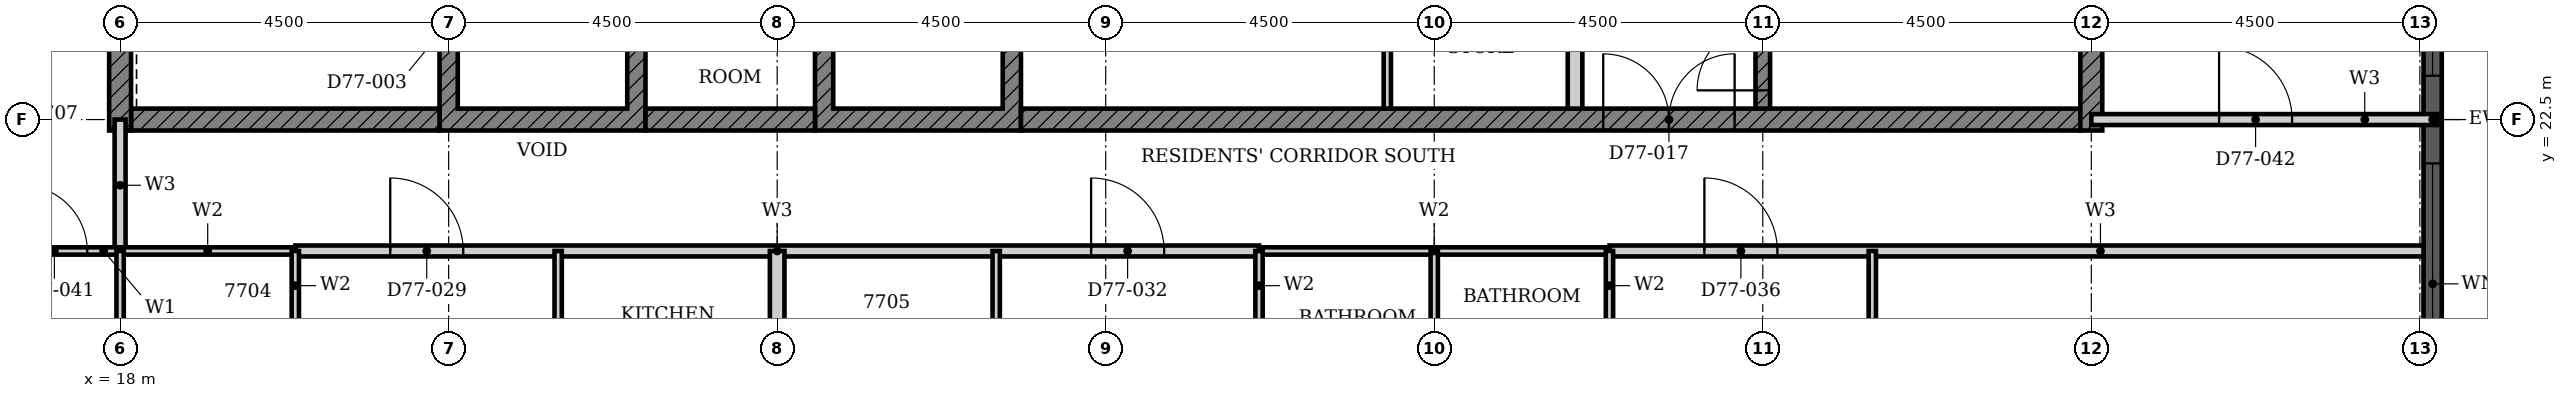
"""IFC4 building model, lengths in metres.
Left out: names, types, materials, properties, quantities, classifications, styles, units other than length and angle.
Written with IfcOpenShell. Run it as: python <this file> out.ifc"""

import sys

from ifc_helpers import new_model, si_unit, direction, frame, frame_2d, origin, place, context, subcontext, project, spatial, polyline, rectangle, outline, extrude, element, fill, save


model = new_model("IFC4")
c1 = context("Model", 3, precision=1e-05, world=origin(), true_north=direction((0.0, 1.0)))
c2 = subcontext(c1, "Body", "Model", "MODEL_VIEW")
j1 = project(units=[si_unit("LENGTHUNIT", "METRE"), si_unit("PLANEANGLEUNIT", "RADIAN")], contexts=[c1])
p1 = place(None, origin())
s1 = spatial("IfcSite", under=j1, at=p1, CompositionType="ELEMENT")
p2 = place(p1, origin())
s2 = spatial("IfcBuilding", under=s1, at=p2, CompositionType="ELEMENT")
p3 = place(p2, frame((0.0, 0.0, 301.9)))
s3 = spatial("IfcBuildingStorey", under=s2, at=p3, CompositionType="ELEMENT", Elevation=301.9)
p4 = place(p3, frame((49.675, 18.3, 0.0), z_axis=(0.0, 0.0, 1.0), x_axis=(0.0, 1.0, 0.0)))
e1 = element("IfcWall", 1, at=p4, inside=s3, PredefinedType="SOLIDWALL", context=c2, shape_type="SweptSolid", body=[
    extrude(rectangle(XDim=8.4, YDim=0.25, at=frame_2d((4.2, 0.0))), origin(), (0.0, 0.0, 1.0), 3.7),
])
p5 = place(p4, frame((0.3, 0.0, 0.45)))
e2 = element("IfcOpeningElement", 2, at=p5, cuts=e1, PredefinedType="OPENING", context=c2, shape_type="SweptSolid", body=[
    extrude(rectangle(XDim=3.3, YDim=1.8, at=frame_2d((1.65, 0.9))), frame((0.0, 0.135, 0.0), z_axis=(0.0, -1.0, 0.0), x_axis=(1.0, 0.0, 0.0)), (0.0, 0.0, 1.0), 0.27),
])
p6 = place(p4, frame((4.8, 0.0, 0.45)))
e3 = element("IfcOpeningElement", 3, at=p6, cuts=e1, PredefinedType="OPENING", context=c2, shape_type="SweptSolid", body=[
    extrude(rectangle(XDim=3.3, YDim=1.8, at=frame_2d((1.65, 0.9))), frame((0.0, 0.135, 0.0), z_axis=(0.0, -1.0, 0.0), x_axis=(1.0, 0.0, 0.0)), (0.0, 0.0, 1.0), 0.27),
])
p7 = place(p3, origin())
e4 = element("IfcWall", 4, at=p7, inside=s3, PredefinedType="SHEAR", context=c2, shape_type="SweptSolid", body=[
    extrude(outline(polyline([(22.375, 22.35), (25.197, 22.35), (25.197, 25.275), (24.947, 25.275), (24.947, 22.65), (22.625, 22.65), (22.625, 25.275), (22.375, 25.275), (22.375, 22.35)])), origin(), (0.0, 0.0, 1.0), 3.2),
])
p8 = place(p3, origin())
e5 = element("IfcWall", 5, at=p8, inside=s3, PredefinedType="SHEAR", context=c2, shape_type="SweptSolid", body=[
    extrude(outline(polyline([(27.518, 22.35), (30.339, 22.35), (30.339, 25.275), (30.089, 25.275), (30.089, 22.65), (27.768, 22.65), (27.768, 25.275), (27.518, 25.275), (27.518, 22.35)])), origin(), (0.0, 0.0, 1.0), 3.2),
])
p9 = place(p3, frame((18.15, 22.5, 0.0), z_axis=(0.0, 0.0, 1.0), x_axis=(1.0, 0.0, 0.0)))
e6 = element("IfcWall", 6, at=p9, inside=s3, PredefinedType="SHEAR", context=c2, shape_type="SweptSolid", body=[
    extrude(rectangle(XDim=4.225, YDim=0.3, at=frame_2d((2.113, 0.0))), origin(), (0.0, 0.0, 1.0), 3.2),
])
p10 = place(p3, frame((25.197, 22.5, 0.0), z_axis=(0.0, 0.0, 1.0), x_axis=(1.0, 0.0, 0.0)))
e7 = element("IfcWall", 7, at=p10, inside=s3, PredefinedType="SHEAR", context=c2, shape_type="SweptSolid", body=[
    extrude(rectangle(XDim=2.321, YDim=0.3, at=frame_2d((1.161, 0.0))), origin(), (0.0, 0.0, 1.0), 3.2),
])
p11 = place(p3, frame((30.339, 22.5, 0.0), z_axis=(0.0, 0.0, 1.0), x_axis=(1.0, 0.0, 0.0)))
e8 = element("IfcWall", 8, at=p11, inside=s3, PredefinedType="SHEAR", context=c2, shape_type="SweptSolid", body=[
    extrude(rectangle(XDim=14.511, YDim=0.3, at=frame_2d((7.255, 0.0))), origin(), (0.0, 0.0, 1.0), 3.2),
])
p12 = place(p11, frame((7.975, 0.0, 0.0)))
e9 = element("IfcOpeningElement", 9, at=p12, cuts=e8, PredefinedType="OPENING", context=c2, shape_type="SweptSolid", body=[
    extrude(rectangle(XDim=1.8, YDim=2.1, at=frame_2d((0.9, 1.05))), frame((0.0, 0.16, 0.0), z_axis=(0.0, -1.0, 0.0), x_axis=(1.0, 0.0, 0.0)), (0.0, 0.0, 1.0), 0.32),
])
for number, where, z_axis, x_axis in (
    (10, (18.0, 22.35, 0.0), (0.0, 0.0, 1.0), (0.0, 1.0, 0.0)),
    (11, (45.0, 22.35, 0.0), (0.0, 0.0, 1.0), (0.0, 1.0, 0.0)),
):
    element("IfcWall", number, at=place(p3, frame(where, z_axis=z_axis, x_axis=x_axis)), inside=s3, PredefinedType="SHEAR", context=c2, shape_type="SweptSolid", body=[
        extrude(rectangle(XDim=9.3, YDim=0.3, at=frame_2d((4.65, 0.0))), origin(), (0.0, 0.0, 1.0), 3.2),
    ])
p13 = place(p3, frame((37.928, 22.65, 0.0), z_axis=(0.0, 0.0, 1.0), x_axis=(0.0, 1.0, 0.0)))
e12 = element("IfcWall", 12, at=p13, inside=s3, PredefinedType="PARTITIONING", context=c2, shape_type="SweptSolid", body=[
    extrude(rectangle(XDim=2.625, YDim=0.2, at=frame_2d((1.312, 0.0))), origin(), (0.0, 0.0, 1.0), 3.2),
])
p14 = place(p3, frame((35.357, 22.65, 0.0), z_axis=(0.0, 0.0, 1.0), x_axis=(0.0, 1.0, 0.0)))
e13 = element("IfcWall", 13, at=p14, inside=s3, PredefinedType="PARTITIONING", context=c2, shape_type="SweptSolid", body=[
    extrude(rectangle(XDim=2.625, YDim=0.1, at=frame_2d((1.312, 0.0))), origin(), (0.0, 0.0, 1.0), 3.2),
])
p15 = place(p3, frame((40.5, 22.65, 0.0), z_axis=(0.0, 0.0, 1.0), x_axis=(0.0, 1.0, 0.0)))
e14 = element("IfcWall", 14, at=p15, inside=s3, PredefinedType="SHEAR", context=c2, shape_type="SweptSolid", body=[
    extrude(rectangle(XDim=5.825, YDim=0.2, at=frame_2d((2.913, 0.0))), origin(), (0.0, 0.0, 1.0), 3.2),
])
p16 = place(p15, frame((0.25, 0.0, 0.0)))
e15 = element("IfcOpeningElement", 15, at=p16, cuts=e14, PredefinedType="OPENING", context=c2, shape_type="SweptSolid", body=[
    extrude(rectangle(XDim=1.8, YDim=2.1, at=frame_2d((0.9, 1.05))), frame((0.0, 0.11, 0.0), z_axis=(0.0, -1.0, 0.0), x_axis=(1.0, 0.0, 0.0)), (0.0, 0.0, 1.0), 0.22),
])
p17 = place(p3, frame((20.4, 20.7, 0.0), z_axis=(0.0, 0.0, 1.0), x_axis=(1.0, 0.0, 0.0)))
e16 = element("IfcWall", 16, at=p17, inside=s3, PredefinedType="PARTITIONING", context=c2, shape_type="SweptSolid", body=[
    extrude(rectangle(XDim=13.2, YDim=0.15, at=frame_2d((6.6, 0.0))), origin(), (0.0, 0.0, 1.0), 3.2),
])
p18 = place(p17, frame((1.3, 0.0, 0.0)))
e17 = element("IfcOpeningElement", 17, at=p18, cuts=e16, PredefinedType="OPENING", context=c2, shape_type="SweptSolid", body=[
    extrude(rectangle(XDim=1.0, YDim=2.2, at=frame_2d((0.5, 1.1))), frame((0.0, 0.085, 0.0), z_axis=(0.0, -1.0, 0.0), x_axis=(1.0, 0.0, 0.0)), (0.0, 0.0, 1.0), 0.17),
])
p19 = place(p17, frame((10.9, 0.0, 0.0)))
e18 = element("IfcOpeningElement", 18, at=p19, cuts=e16, PredefinedType="OPENING", context=c2, shape_type="SweptSolid", body=[
    extrude(rectangle(XDim=1.0, YDim=2.2, at=frame_2d((0.5, 1.1))), frame((0.0, 0.085, 0.0), z_axis=(0.0, -1.0, 0.0), x_axis=(1.0, 0.0, 0.0)), (0.0, 0.0, 1.0), 0.17),
])
p20 = place(p3, frame((38.4, 20.7, 0.0), z_axis=(0.0, 0.0, 1.0), x_axis=(1.0, 0.0, 0.0)))
e19 = element("IfcWall", 19, at=p20, inside=s3, PredefinedType="PARTITIONING", context=c2, shape_type="SweptSolid", body=[
    extrude(rectangle(XDim=11.15, YDim=0.15, at=frame_2d((5.575, 0.0))), origin(), (0.0, 0.0, 1.0), 3.2),
])
p21 = place(p20, frame((1.3, 0.0, 0.0)))
e20 = element("IfcOpeningElement", 20, at=p21, cuts=e19, PredefinedType="OPENING", context=c2, shape_type="SweptSolid", body=[
    extrude(rectangle(XDim=1.0, YDim=2.2, at=frame_2d((0.5, 1.1))), frame((0.0, 0.085, 0.0), z_axis=(0.0, -1.0, 0.0), x_axis=(1.0, 0.0, 0.0)), (0.0, 0.0, 1.0), 0.17),
])
p22 = place(p3, frame((45.0, 22.5, 0.0), z_axis=(0.0, 0.0, 1.0), x_axis=(1.0, 0.0, 0.0)))
e21 = element("IfcWall", 21, at=p22, inside=s3, PredefinedType="PARTITIONING", context=c2, shape_type="SweptSolid", body=[
    extrude(rectangle(XDim=4.74, YDim=0.15, at=frame_2d((2.37, 0.0))), origin(), (0.0, 0.0, 1.0), 3.2),
])
p23 = place(p22, frame((1.75, 0.0, 0.0)))
e22 = element("IfcOpeningElement", 22, at=p23, cuts=e21, PredefinedType="OPENING", context=c2, shape_type="SweptSolid", body=[
    extrude(rectangle(XDim=1.0, YDim=2.2, at=frame_2d((0.5, 1.1))), frame((0.0, 0.085, 0.0), z_axis=(0.0, -1.0, 0.0), x_axis=(1.0, 0.0, 0.0)), (0.0, 0.0, 1.0), 0.17),
])
p24 = place(p3, frame((18.0, 20.7, 0.0), z_axis=(0.0, 0.0, 1.0), x_axis=(0.0, 1.0, 0.0)))
e23 = element("IfcWall", 23, at=p24, inside=s3, PredefinedType="PARTITIONING", context=c2, shape_type="SweptSolid", body=[
    extrude(rectangle(XDim=1.8, YDim=0.15, at=frame_2d((0.9, 0.0))), origin(), (0.0, 0.0, 1.0), 3.2),
])
p25 = place(p3, frame((16.2, 20.7, 0.0), z_axis=(0.0, 0.0, 1.0), x_axis=(1.0, 0.0, 0.0)))
e24 = element("IfcWall", 24, at=p25, inside=s3, PredefinedType="PARTITIONING", context=c2, shape_type="SweptSolid", body=[
    extrude(rectangle(XDim=1.8, YDim=0.1, at=frame_2d((0.9, 0.0))), origin(), (0.0, 0.0, 1.0), 3.2),
])
p26 = place(p25, frame((0.45, 0.0, 0.0)))
e25 = element("IfcOpeningElement", 25, at=p26, cuts=e24, PredefinedType="OPENING", context=c2, shape_type="SweptSolid", body=[
    extrude(rectangle(XDim=0.9, YDim=2.1, at=frame_2d((0.45, 1.05))), frame((0.0, 0.06, 0.0), z_axis=(0.0, -1.0, 0.0), x_axis=(1.0, 0.0, 0.0)), (0.0, 0.0, 1.0), 0.12),
])
for number, where, z_axis, x_axis in (
    (26, (24.0, 18.0, 0.0), (0.0, 0.0, 1.0), (0.0, 1.0, 0.0)),
    (27, (30.0, 18.0, 0.0), (0.0, 0.0, 1.0), (0.0, 1.0, 0.0)),
    (28, (42.0, 18.0, 0.0), (0.0, 0.0, 1.0), (0.0, 1.0, 0.0)),
):
    element("IfcWall", number, at=place(p3, frame(where, z_axis=z_axis, x_axis=x_axis)), inside=s3, PredefinedType="PARTITIONING", context=c2, shape_type="SweptSolid", body=[
        extrude(rectangle(XDim=2.7, YDim=0.1, at=frame_2d((1.35, 0.0))), origin(), (0.0, 0.0, 1.0), 3.2),
    ])
p27 = place(p3, frame((27.0, 13.31, 0.0), z_axis=(0.0, 0.0, 1.0), x_axis=(0.0, 1.0, 0.0)))
e29 = element("IfcWall", 29, at=p27, inside=s3, PredefinedType="PARTITIONING", context=c2, shape_type="SweptSolid", body=[
    extrude(rectangle(XDim=7.39, YDim=0.2, at=frame_2d((3.695, 0.0))), origin(), (0.0, 0.0, 1.0), 3.2),
])
p28 = place(p3, frame((18.0, 20.7, 0.0), z_axis=(0.0, 0.0, 1.0), x_axis=(1.0, 0.0, 0.0)))
e30 = element("IfcWall", 30, at=p28, inside=s3, PredefinedType="PARTITIONING", context=c2, shape_type="SweptSolid", body=[
    extrude(rectangle(XDim=2.4, YDim=0.1, at=frame_2d((1.2, 0.0))), origin(), (0.0, 0.0, 1.0), 3.2),
])
p29 = place(p3, frame((33.6, 20.7, 0.0), z_axis=(0.0, 0.0, 1.0), x_axis=(1.0, 0.0, 0.0)))
e31 = element("IfcWall", 31, at=p29, inside=s3, PredefinedType="PARTITIONING", context=c2, shape_type="SweptSolid", body=[
    extrude(rectangle(XDim=4.8, YDim=0.1, at=frame_2d((2.4, 0.0))), origin(), (0.0, 0.0, 1.0), 3.2),
])
p30 = place(p3, frame((18.0, 18.0, 0.0), z_axis=(0.0, 0.0, 1.0), x_axis=(0.0, 1.0, 0.0)))
e32 = element("IfcWall", 32, at=p30, inside=s3, PredefinedType="PARTITIONING", context=c2, shape_type="SweptSolid", body=[
    extrude(rectangle(XDim=2.7, YDim=0.1, at=frame_2d((1.35, 0.0))), origin(), (0.0, 0.0, 1.0), 3.2),
])
p31 = place(p3, frame((20.4, 18.0, 0.0), z_axis=(0.0, 0.0, 1.0), x_axis=(0.0, 1.0, 0.0)))
e33 = element("IfcWall", 33, at=p31, inside=s3, PredefinedType="PARTITIONING", context=c2, shape_type="SweptSolid", body=[
    extrude(rectangle(XDim=2.7, YDim=0.1, at=frame_2d((1.35, 0.0))), origin(), (0.0, 0.0, 1.0), 3.2),
])
p32 = place(p31, frame((0.95, 0.0, 0.0)))
e34 = element("IfcOpeningElement", 34, at=p32, cuts=e33, PredefinedType="OPENING", context=c2, shape_type="SweptSolid", body=[
    extrude(rectangle(XDim=0.8, YDim=2.1, at=frame_2d((0.4, 1.05))), frame((0.0, 0.06, 0.0), z_axis=(0.0, -1.0, 0.0), x_axis=(1.0, 0.0, 0.0)), (0.0, 0.0, 1.0), 0.12),
])
p33 = place(p3, frame((33.6, 18.0, 0.0), z_axis=(0.0, 0.0, 1.0), x_axis=(0.0, 1.0, 0.0)))
e35 = element("IfcWall", 35, at=p33, inside=s3, PredefinedType="PARTITIONING", context=c2, shape_type="SweptSolid", body=[
    extrude(rectangle(XDim=2.7, YDim=0.1, at=frame_2d((1.35, 0.0))), origin(), (0.0, 0.0, 1.0), 3.2),
])
p34 = place(p33, frame((0.95, 0.0, 0.0)))
e36 = element("IfcOpeningElement", 36, at=p34, cuts=e35, PredefinedType="OPENING", context=c2, shape_type="SweptSolid", body=[
    extrude(rectangle(XDim=0.8, YDim=2.1, at=frame_2d((0.4, 1.05))), frame((0.0, 0.06, 0.0), z_axis=(0.0, -1.0, 0.0), x_axis=(1.0, 0.0, 0.0)), (0.0, 0.0, 1.0), 0.12),
])
p35 = place(p3, frame((36.0, 18.0, 0.0), z_axis=(0.0, 0.0, 1.0), x_axis=(0.0, 1.0, 0.0)))
e37 = element("IfcWall", 37, at=p35, inside=s3, PredefinedType="PARTITIONING", context=c2, shape_type="SweptSolid", body=[
    extrude(rectangle(XDim=2.7, YDim=0.1, at=frame_2d((1.35, 0.0))), origin(), (0.0, 0.0, 1.0), 3.2),
])
p36 = place(p3, frame((38.4, 18.0, 0.0), z_axis=(0.0, 0.0, 1.0), x_axis=(0.0, 1.0, 0.0)))
e38 = element("IfcWall", 38, at=p36, inside=s3, PredefinedType="PARTITIONING", context=c2, shape_type="SweptSolid", body=[
    extrude(rectangle(XDim=2.7, YDim=0.1, at=frame_2d((1.35, 0.0))), origin(), (0.0, 0.0, 1.0), 3.2),
])
p37 = place(p36, frame((0.95, 0.0, 0.0)))
e39 = element("IfcOpeningElement", 39, at=p37, cuts=e38, PredefinedType="OPENING", context=c2, shape_type="SweptSolid", body=[
    extrude(rectangle(XDim=0.8, YDim=2.1, at=frame_2d((0.4, 1.05))), frame((0.0, 0.06, 0.0), z_axis=(0.0, -1.0, 0.0), x_axis=(1.0, 0.0, 0.0)), (0.0, 0.0, 1.0), 0.12),
])
p38 = place(p5, origin())
e40 = element("IfcWindow", 40, at=p38, inside=s3, PartitioningType="SINGLE_PANEL", PredefinedType="WINDOW", context=c2, shape_type="SweptSolid", body=[
    extrude(rectangle(XDim=3.3, YDim=1.8, at=frame_2d((1.65, 0.9))), frame((0.0, 0.03, 0.0), z_axis=(0.0, -1.0, 0.0), x_axis=(1.0, 0.0, 0.0)), (0.0, 0.0, 1.0), 0.06),
])
fill(e2, e40)
p39 = place(p6, origin())
e41 = element("IfcWindow", 41, at=p39, inside=s3, PartitioningType="SINGLE_PANEL", PredefinedType="WINDOW", context=c2, shape_type="SweptSolid", body=[
    extrude(rectangle(XDim=3.3, YDim=1.8, at=frame_2d((1.65, 0.9))), frame((0.0, 0.03, 0.0), z_axis=(0.0, -1.0, 0.0), x_axis=(1.0, 0.0, 0.0)), (0.0, 0.0, 1.0), 0.06),
])
fill(e3, e41)
p40 = place(p16, origin())
e42 = element("IfcDoor", 42, at=p40, inside=s3, OperationType="DOUBLE_DOOR_SINGLE_SWING", PredefinedType="DOOR", context=c2, shape_type="SweptSolid", body=[
    extrude(rectangle(XDim=1.8, YDim=2.1, at=frame_2d((0.9, 1.05))), frame((0.0, 0.025, 0.0), z_axis=(0.0, -1.0, 0.0), x_axis=(1.0, 0.0, 0.0)), (0.0, 0.0, 1.0), 0.05),
])
fill(e15, e42)
p41 = place(p12, origin())
e43 = element("IfcDoor", 43, at=p41, inside=s3, OperationType="DOUBLE_DOOR_SINGLE_SWING", PredefinedType="DOOR", context=c2, shape_type="SweptSolid", body=[
    extrude(rectangle(XDim=1.8, YDim=2.1, at=frame_2d((0.9, 1.05))), frame((0.0, 0.025, 0.0), z_axis=(0.0, -1.0, 0.0), x_axis=(1.0, 0.0, 0.0)), (0.0, 0.0, 1.0), 0.05),
])
fill(e9, e43)
p42 = place(p18, origin())
e44 = element("IfcDoor", 44, at=p42, inside=s3, OperationType="SINGLE_SWING_LEFT", PredefinedType="DOOR", context=c2, shape_type="SweptSolid", body=[
    extrude(rectangle(XDim=1.0, YDim=2.2, at=frame_2d((0.5, 1.1))), frame((0.0, 0.025, 0.0), z_axis=(0.0, -1.0, 0.0), x_axis=(1.0, 0.0, 0.0)), (0.0, 0.0, 1.0), 0.05),
])
fill(e17, e44)
p43 = place(p19, origin())
e45 = element("IfcDoor", 45, at=p43, inside=s3, OperationType="SINGLE_SWING_RIGHT", PredefinedType="DOOR", context=c2, shape_type="SweptSolid", body=[
    extrude(rectangle(XDim=1.0, YDim=2.2, at=frame_2d((0.5, 1.1))), frame((0.0, 0.025, 0.0), z_axis=(0.0, -1.0, 0.0), x_axis=(1.0, 0.0, 0.0)), (0.0, 0.0, 1.0), 0.05),
])
fill(e18, e45)
p44 = place(p21, origin())
e46 = element("IfcDoor", 46, at=p44, inside=s3, OperationType="SINGLE_SWING_RIGHT", PredefinedType="DOOR", context=c2, shape_type="SweptSolid", body=[
    extrude(rectangle(XDim=1.0, YDim=2.2, at=frame_2d((0.5, 1.1))), frame((0.0, 0.025, 0.0), z_axis=(0.0, -1.0, 0.0), x_axis=(1.0, 0.0, 0.0)), (0.0, 0.0, 1.0), 0.05),
])
fill(e20, e46)
p45 = place(p26, origin())
e47 = element("IfcDoor", 47, at=p45, inside=s3, OperationType="SINGLE_SWING_RIGHT", PredefinedType="DOOR", context=c2, shape_type="SweptSolid", body=[
    extrude(rectangle(XDim=0.9, YDim=2.1, at=frame_2d((0.45, 1.05))), frame((0.0, 0.025, 0.0), z_axis=(0.0, -1.0, 0.0), x_axis=(1.0, 0.0, 0.0)), (0.0, 0.0, 1.0), 0.05),
])
fill(e25, e47)
p46 = place(p23, origin())
e48 = element("IfcDoor", 48, at=p46, inside=s3, OperationType="SINGLE_SWING_LEFT", PredefinedType="DOOR", context=c2, shape_type="SweptSolid", body=[
    extrude(rectangle(XDim=1.0, YDim=2.2, at=frame_2d((0.5, 1.1))), frame((0.0, 0.025, 0.0), z_axis=(0.0, -1.0, 0.0), x_axis=(1.0, 0.0, 0.0)), (0.0, 0.0, 1.0), 0.05),
])
fill(e22, e48)
save(model, sys.argv[1])
